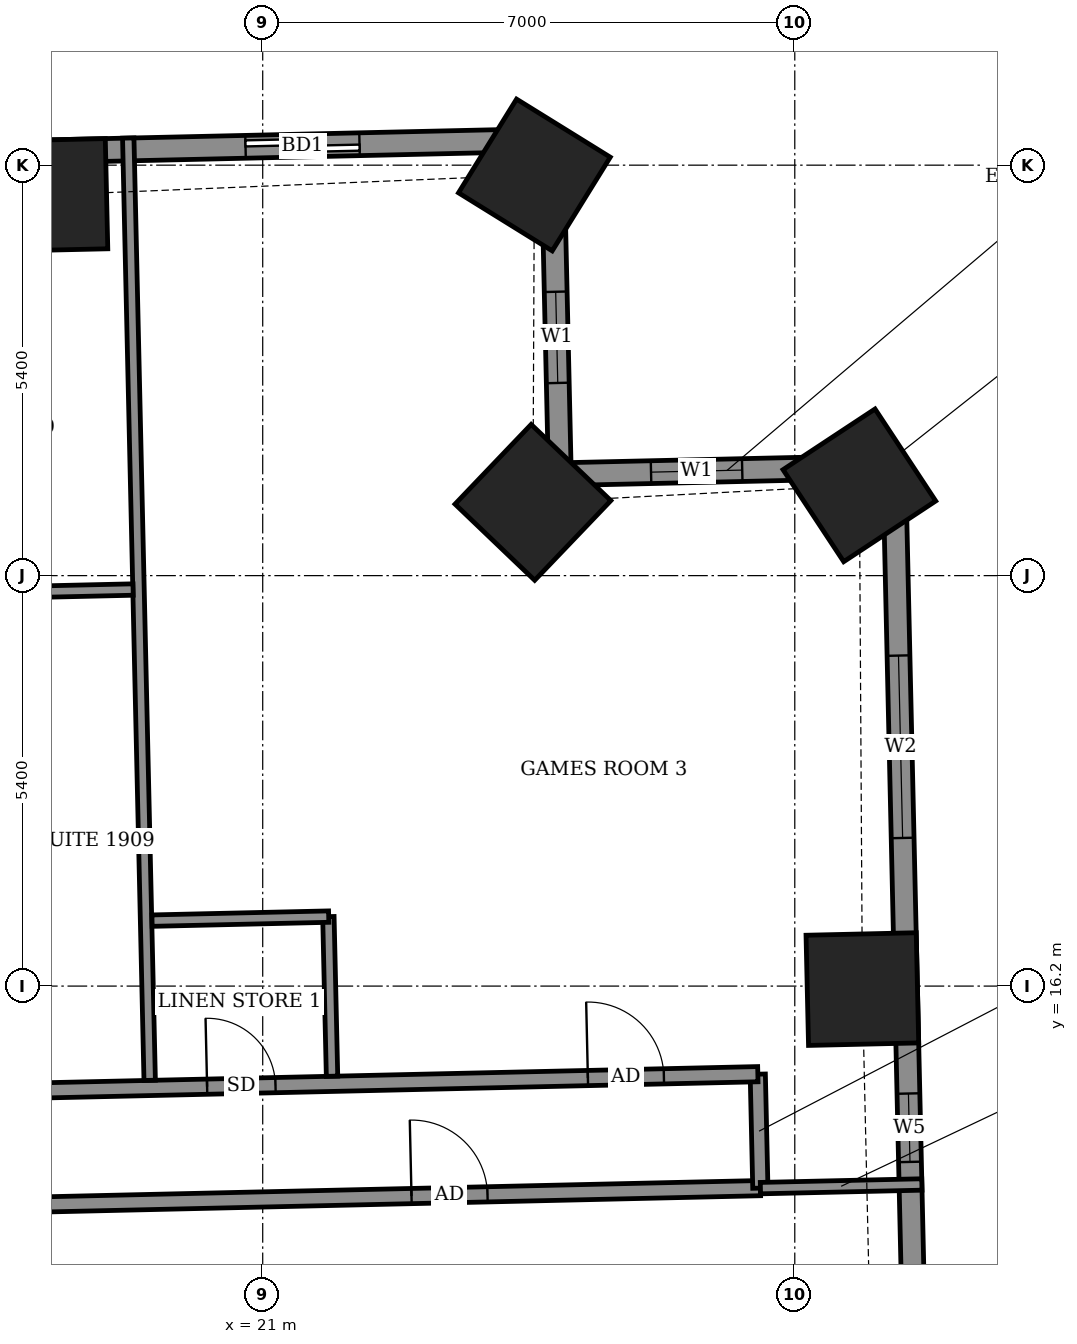
"""IFC4 building model, lengths in metres.
Left out: names, types, materials, properties, quantities, classifications, styles, units other than length and angle.
Written with IfcOpenShell. Run it as: python <this file> out.ifc"""

import sys

from ifc_helpers import new_model, si_unit, direction, frame, frame_2d, origin, origin_2d, place, context, subcontext, project, spatial, rectangle, extrude, element, fill, save


model = new_model("IFC4")
c1 = context("Model", 3, precision=1e-05, world=origin(), true_north=direction((0.0, 1.0)))
c2 = subcontext(c1, "Body", "Model", "MODEL_VIEW")
j1 = project(units=[si_unit("LENGTHUNIT", "METRE"), si_unit("PLANEANGLEUNIT", "RADIAN")], contexts=[c1])
p1 = place(None, origin())
s1 = spatial("IfcSite", under=j1, at=p1, CompositionType="ELEMENT")
p2 = place(p1, origin())
s2 = spatial("IfcBuilding", under=s1, at=p2, CompositionType="ELEMENT")
p3 = place(p2, frame((0.0, 0.0, 79.3)))
s3 = spatial("IfcBuildingStorey", under=s2, at=p3, CompositionType="ELEMENT", Elevation=79.3)
for number, where, z_axis, x_axis in (
    (1, (28.889, 16.161, -0.55), (0.0, 0.0, 1.0), (-0.023, 1.0, 0.0)),
    (2, (28.85, 22.788, -0.55), (0.0, 0.0, 1.0), (-0.551, 0.835, 0.0)),
    (3, (24.555, 22.564, -0.55), (0.0, 0.0, 1.0), (-0.723, 0.691, 0.0)),
    (4, (24.574, 26.871, -0.55), (0.0, 0.0, 1.0), (-0.85, 0.527, 0.0)),
    (5, (18.22, 26.608, -0.55), (0.0, 0.0, 1.0), (-1.0, -0.023, 0.0)),
):
    element("IfcColumn", number, at=place(p3, frame(where, z_axis=z_axis, x_axis=x_axis)), inside=s3, PredefinedType="COLUMN", context=c2, shape_type="SweptSolid", body=[
        extrude(rectangle(XDim=1.45, YDim=1.45, at=origin_2d()), origin(), (0.0, 0.0, 1.0), 3.6),
    ])
p4 = place(p3, frame((29.624, 9.108, 0.0), z_axis=(0.0, 0.0, 1.0), x_axis=(-0.022679601751, 0.999742784752, 0.0)))
e6 = element("IfcWall", 6, at=p4, inside=s3, PredefinedType="SOLIDWALL", context=c2, shape_type="SweptSolid", body=[
    extrude(rectangle(XDim=13.93, YDim=0.3, at=frame_2d((6.965, 0.0))), origin(), (0.0, 0.0, 1.0), 3.05),
])
p5 = place(p4, frame((1.754, 0.0, 0.0)))
e7 = element("IfcOpeningElement", 7, at=p5, cuts=e6, PredefinedType="OPENING", context=c2, shape_type="SweptSolid", body=[
    extrude(rectangle(XDim=1.5, YDim=2.4, at=frame_2d((0.75, 1.2))), frame((0.0, 0.16, 0.0), z_axis=(0.0, -1.0, 0.0), x_axis=(1.0, 0.0, 0.0)), (0.0, 0.0, 1.0), 0.32),
])
p6 = place(p4, frame((4.78, 0.0, 0.9)))
e8 = element("IfcOpeningElement", 8, at=p6, cuts=e6, PredefinedType="OPENING", context=c2, shape_type="SweptSolid", body=[
    extrude(rectangle(XDim=0.9, YDim=1.5, at=frame_2d((0.45, 0.75))), frame((0.0, 0.16, 0.0), z_axis=(0.0, -1.0, 0.0), x_axis=(1.0, 0.0, 0.0)), (0.0, 0.0, 1.0), 0.32),
])
p7 = place(p4, frame((9.043, 0.0, 0.9)))
e9 = element("IfcOpeningElement", 9, at=p7, cuts=e6, PredefinedType="OPENING", context=c2, shape_type="SweptSolid", body=[
    extrude(rectangle(XDim=2.4, YDim=1.5, at=frame_2d((1.2, 0.75))), frame((0.0, 0.16, 0.0), z_axis=(0.0, -1.0, 0.0), x_axis=(1.0, 0.0, 0.0)), (0.0, 0.0, 1.0), 0.32),
])
p8 = place(p3, frame((29.308, 23.034, 0.0), z_axis=(0.0, 0.0, 1.0), x_axis=(-0.999742493928, -0.022692418004, 0.0)))
e10 = element("IfcWall", 10, at=p8, inside=s3, PredefinedType="SOLIDWALL", context=c2, shape_type="SweptSolid", body=[
    extrude(rectangle(XDim=4.4, YDim=0.3, at=frame_2d((2.2, 0.0))), origin(), (0.0, 0.0, 1.0), 2.55),
])
p9 = place(p8, frame((2.0, 0.0, 0.9)))
e11 = element("IfcOpeningElement", 11, at=p9, cuts=e10, PredefinedType="OPENING", context=c2, shape_type="SweptSolid", body=[
    extrude(rectangle(XDim=1.2, YDim=1.5, at=frame_2d((0.6, 0.75))), frame((0.0, 0.16, 0.0), z_axis=(0.0, -1.0, 0.0), x_axis=(1.0, 0.0, 0.0)), (0.0, 0.0, 1.0), 0.32),
])
p10 = place(p3, frame((24.909, 22.934, 0.0), z_axis=(0.0, 0.0, 1.0), x_axis=(-0.022693676786, 0.999742465355, 0.0)))
e12 = element("IfcWall", 12, at=p10, inside=s3, PredefinedType="SOLIDWALL", context=c2, shape_type="SweptSolid", body=[
    extrude(rectangle(XDim=4.4, YDim=0.3, at=frame_2d((2.2, 0.0))), origin(), (0.0, 0.0, 1.0), 2.55),
])
p11 = place(p10, frame((1.201, 0.0, 0.9)))
e13 = element("IfcOpeningElement", 13, at=p11, cuts=e12, PredefinedType="OPENING", context=c2, shape_type="SweptSolid", body=[
    extrude(rectangle(XDim=1.2, YDim=1.5, at=frame_2d((0.6, 0.75))), frame((0.0, 0.16, 0.0), z_axis=(0.0, -1.0, 0.0), x_axis=(1.0, 0.0, 0.0)), (0.0, 0.0, 1.0), 0.32),
])
p12 = place(p3, frame((24.809, 27.333, 0.0), z_axis=(0.0, 0.0, 1.0), x_axis=(-0.999742489858, -0.022692597327, 0.0)))
e14 = element("IfcWall", 14, at=p12, inside=s3, PredefinedType="SOLIDWALL", context=c2, shape_type="SweptSolid", body=[
    extrude(rectangle(XDim=46.972, YDim=0.3, at=frame_2d((23.486, 0.0))), origin(), (0.0, 0.0, 1.0), 3.05),
])
p13 = place(p12, frame((2.536, 0.0, 0.0)))
e15 = element("IfcOpeningElement", 15, at=p13, cuts=e14, PredefinedType="OPENING", context=c2, shape_type="SweptSolid", body=[
    extrude(rectangle(XDim=1.5, YDim=2.4, at=frame_2d((0.75, 1.2))), frame((0.0, 0.16, 0.0), z_axis=(0.0, -1.0, 0.0), x_axis=(1.0, 0.0, 0.0)), (0.0, 0.0, 1.0), 0.32),
])
p14 = place(p12, frame((7.726, 0.0, 0.0)))
e16 = element("IfcOpeningElement", 16, at=p14, cuts=e14, PredefinedType="OPENING", context=c2, shape_type="SweptSolid", body=[
    extrude(rectangle(XDim=1.5, YDim=2.4, at=frame_2d((0.75, 1.2))), frame((0.0, 0.16, 0.0), z_axis=(0.0, -1.0, 0.0), x_axis=(1.0, 0.0, 0.0)), (0.0, 0.0, 1.0), 0.32),
])
p15 = place(p12, frame((10.627, 0.0, 0.0)))
e17 = element("IfcOpeningElement", 17, at=p15, cuts=e14, PredefinedType="OPENING", context=c2, shape_type="SweptSolid", body=[
    extrude(rectangle(XDim=1.5, YDim=2.4, at=frame_2d((0.75, 1.2))), frame((0.0, 0.16, 0.0), z_axis=(0.0, -1.0, 0.0), x_axis=(1.0, 0.0, 0.0)), (0.0, 0.0, 1.0), 0.32),
])
p16 = place(p12, frame((15.872, 0.0, 0.0)))
e18 = element("IfcOpeningElement", 18, at=p16, cuts=e14, PredefinedType="OPENING", context=c2, shape_type="SweptSolid", body=[
    extrude(rectangle(XDim=1.5, YDim=2.4, at=frame_2d((0.75, 1.2))), frame((0.0, 0.16, 0.0), z_axis=(0.0, -1.0, 0.0), x_axis=(1.0, 0.0, 0.0)), (0.0, 0.0, 1.0), 0.32),
])
p17 = place(p12, frame((21.253, 0.0, 0.0)))
e19 = element("IfcOpeningElement", 19, at=p17, cuts=e14, PredefinedType="OPENING", context=c2, shape_type="SweptSolid", body=[
    extrude(rectangle(XDim=1.5, YDim=2.4, at=frame_2d((0.75, 1.2))), frame((0.0, 0.16, 0.0), z_axis=(0.0, -1.0, 0.0), x_axis=(1.0, 0.0, 0.0)), (0.0, 0.0, 1.0), 0.32),
])
p18 = place(p12, frame((24.155, 0.0, 0.0)))
e20 = element("IfcOpeningElement", 20, at=p18, cuts=e14, PredefinedType="OPENING", context=c2, shape_type="SweptSolid", body=[
    extrude(rectangle(XDim=1.5, YDim=2.4, at=frame_2d((0.75, 1.2))), frame((0.0, 0.16, 0.0), z_axis=(0.0, -1.0, 0.0), x_axis=(1.0, 0.0, 0.0)), (0.0, 0.0, 1.0), 0.32),
])
p19 = place(p12, frame((29.247, 0.0, 0.0)))
e21 = element("IfcOpeningElement", 21, at=p19, cuts=e14, PredefinedType="OPENING", context=c2, shape_type="SweptSolid", body=[
    extrude(rectangle(XDim=1.5, YDim=2.4, at=frame_2d((0.75, 1.2))), frame((0.0, 0.16, 0.0), z_axis=(0.0, -1.0, 0.0), x_axis=(1.0, 0.0, 0.0)), (0.0, 0.0, 1.0), 0.32),
])
p20 = place(p12, frame((34.581, 0.0, 0.0)))
e22 = element("IfcOpeningElement", 22, at=p20, cuts=e14, PredefinedType="OPENING", context=c2, shape_type="SweptSolid", body=[
    extrude(rectangle(XDim=1.5, YDim=2.4, at=frame_2d((0.75, 1.2))), frame((0.0, 0.16, 0.0), z_axis=(0.0, -1.0, 0.0), x_axis=(1.0, 0.0, 0.0)), (0.0, 0.0, 1.0), 0.32),
])
p21 = place(p12, frame((37.483, 0.0, 0.0)))
e23 = element("IfcOpeningElement", 23, at=p21, cuts=e14, PredefinedType="OPENING", context=c2, shape_type="SweptSolid", body=[
    extrude(rectangle(XDim=1.5, YDim=2.4, at=frame_2d((0.75, 1.2))), frame((0.0, 0.16, 0.0), z_axis=(0.0, -1.0, 0.0), x_axis=(1.0, 0.0, 0.0)), (0.0, 0.0, 1.0), 0.32),
])
p22 = place(p12, frame((42.35, 0.0, 0.9)))
e24 = element("IfcOpeningElement", 24, at=p22, cuts=e14, PredefinedType="OPENING", context=c2, shape_type="SweptSolid", body=[
    extrude(rectangle(XDim=2.4, YDim=1.5, at=frame_2d((1.2, 0.75))), frame((0.0, 0.16, 0.0), z_axis=(0.0, -1.0, 0.0), x_axis=(1.0, 0.0, 0.0)), (0.0, 0.0, 1.0), 0.32),
])
p23 = place(p3, frame((17.176, 13.306, 0.0), z_axis=(0.0, 0.0, 1.0), x_axis=(0.999741057438, 0.022755616292, 0.0)))
e25 = element("IfcWall", 25, at=p23, inside=s3, PredefinedType="PARTITIONING", context=c2, shape_type="SweptSolid", body=[
    extrude(rectangle(XDim=10.375, YDim=0.2, at=frame_2d((5.188, 0.0))), origin(), (0.0, 0.0, 1.0), 3.05),
])
p24 = place(p23, frame((5.783, 0.0, 0.0)))
e26 = element("IfcOpeningElement", 26, at=p24, cuts=e25, PredefinedType="OPENING", context=c2, shape_type="SweptSolid", body=[
    extrude(rectangle(XDim=1.0, YDim=2.1, at=frame_2d((0.5, 1.05))), frame((0.0, 0.11, 0.0), z_axis=(0.0, -1.0, 0.0), x_axis=(1.0, 0.0, 0.0)), (0.0, 0.0, 1.0), 0.22),
])
p25 = place(p3, frame((27.547, 13.542, 0.0), z_axis=(0.0, 0.0, 1.0), x_axis=(-0.02279537805, 0.999740151609, 0.0)))
e27 = element("IfcWall", 27, at=p25, inside=s3, PredefinedType="PARTITIONING", context=c2, shape_type="SweptSolid", body=[
    extrude(rectangle(XDim=1.5, YDim=0.2, at=frame_2d((0.75, 0.0))), origin(), (0.0, 0.0, 1.0), 3.05),
])
p26 = place(p3, frame((27.548, 13.542, 0.0), z_axis=(0.0, 0.0, 1.0), x_axis=(0.999743730464, 0.022637875276, 0.0)))
e28 = element("IfcWall", 28, at=p26, inside=s3, PredefinedType="PARTITIONING", context=c2, shape_type="SweptSolid", body=[
    extrude(rectangle(XDim=2.125, YDim=0.15, at=frame_2d((1.062, 0.0))), origin(), (0.0, 0.0, 1.0), 2.55),
])
p27 = place(p3, frame((-24.895, 13.852, 0.0), z_axis=(0.0, 0.0, 1.0), x_axis=(0.999742765181, 0.02268046447, 0.0)))
e29 = element("IfcWall", 29, at=p27, inside=s3, PredefinedType="PARTITIONING", context=c2, shape_type="SweptSolid", body=[
    extrude(rectangle(XDim=52.422, YDim=0.2, at=frame_2d((26.211, 0.0))), origin(), (0.0, 0.0, 1.0), 3.05),
])
p28 = place(p27, frame((50.186, 0.0, 0.0)))
e30 = element("IfcOpeningElement", 30, at=p28, cuts=e29, PredefinedType="OPENING", context=c2, shape_type="SweptSolid", body=[
    extrude(rectangle(XDim=1.0, YDim=2.1, at=frame_2d((0.5, 1.05))), frame((0.0, 0.11, 0.0), z_axis=(0.0, -1.0, 0.0), x_axis=(1.0, 0.0, 0.0)), (0.0, 0.0, 1.0), 0.22),
])
p29 = place(p27, frame((45.175, 0.0, 0.0)))
e31 = element("IfcOpeningElement", 31, at=p29, cuts=e29, PredefinedType="OPENING", context=c2, shape_type="SweptSolid", body=[
    extrude(rectangle(XDim=0.9, YDim=2.1, at=frame_2d((0.45, 1.05))), frame((0.0, 0.11, 0.0), z_axis=(0.0, -1.0, 0.0), x_axis=(1.0, 0.0, 0.0)), (0.0, 0.0, 1.0), 0.22),
])
p30 = place(p27, frame((40.625, 0.0, 0.0)))
e32 = element("IfcOpeningElement", 32, at=p30, cuts=e29, PredefinedType="OPENING", context=c2, shape_type="SweptSolid", body=[
    extrude(rectangle(XDim=0.9, YDim=2.1, at=frame_2d((0.45, 1.05))), frame((0.0, 0.11, 0.0), z_axis=(0.0, -1.0, 0.0), x_axis=(1.0, 0.0, 0.0)), (0.0, 0.0, 1.0), 0.22),
])
p31 = place(p27, frame((38.65, 0.0, 0.0)))
e33 = element("IfcOpeningElement", 33, at=p31, cuts=e29, PredefinedType="OPENING", context=c2, shape_type="SweptSolid", body=[
    extrude(rectangle(XDim=0.9, YDim=2.1, at=frame_2d((0.45, 1.05))), frame((0.0, 0.11, 0.0), z_axis=(0.0, -1.0, 0.0), x_axis=(1.0, 0.0, 0.0)), (0.0, 0.0, 1.0), 0.22),
])
p32 = place(p27, frame((31.725, 0.0, 0.0)))
e34 = element("IfcOpeningElement", 34, at=p32, cuts=e29, PredefinedType="OPENING", context=c2, shape_type="SweptSolid", body=[
    extrude(rectangle(XDim=0.9, YDim=2.1, at=frame_2d((0.45, 1.05))), frame((0.0, 0.11, 0.0), z_axis=(0.0, -1.0, 0.0), x_axis=(1.0, 0.0, 0.0)), (0.0, 0.0, 1.0), 0.22),
])
p33 = place(p27, frame((29.575, 0.0, 0.0)))
e35 = element("IfcOpeningElement", 35, at=p33, cuts=e29, PredefinedType="OPENING", context=c2, shape_type="SweptSolid", body=[
    extrude(rectangle(XDim=0.9, YDim=2.1, at=frame_2d((0.45, 1.05))), frame((0.0, 0.11, 0.0), z_axis=(0.0, -1.0, 0.0), x_axis=(1.0, 0.0, 0.0)), (0.0, 0.0, 1.0), 0.22),
])
p34 = place(p27, frame((22.75, 0.0, 0.0)))
e36 = element("IfcOpeningElement", 36, at=p34, cuts=e29, PredefinedType="OPENING", context=c2, shape_type="SweptSolid", body=[
    extrude(rectangle(XDim=0.9, YDim=2.1, at=frame_2d((0.45, 1.05))), frame((0.0, 0.11, 0.0), z_axis=(0.0, -1.0, 0.0), x_axis=(1.0, 0.0, 0.0)), (0.0, 0.0, 1.0), 0.22),
])
p35 = place(p27, frame((20.75, 0.0, 0.0)))
e37 = element("IfcOpeningElement", 37, at=p35, cuts=e29, PredefinedType="OPENING", context=c2, shape_type="SweptSolid", body=[
    extrude(rectangle(XDim=0.9, YDim=2.1, at=frame_2d((0.45, 1.05))), frame((0.0, 0.11, 0.0), z_axis=(0.0, -1.0, 0.0), x_axis=(1.0, 0.0, 0.0)), (0.0, 0.0, 1.0), 0.22),
])
p36 = place(p27, frame((13.95, 0.0, 0.0)))
e38 = element("IfcOpeningElement", 38, at=p36, cuts=e29, PredefinedType="OPENING", context=c2, shape_type="SweptSolid", body=[
    extrude(rectangle(XDim=0.9, YDim=2.1, at=frame_2d((0.45, 1.05))), frame((0.0, 0.11, 0.0), z_axis=(0.0, -1.0, 0.0), x_axis=(1.0, 0.0, 0.0)), (0.0, 0.0, 1.0), 0.22),
])
p37 = place(p27, frame((11.85, 0.0, 0.0)))
e39 = element("IfcOpeningElement", 39, at=p37, cuts=e29, PredefinedType="OPENING", context=c2, shape_type="SweptSolid", body=[
    extrude(rectangle(XDim=0.9, YDim=2.1, at=frame_2d((0.45, 1.05))), frame((0.0, 0.11, 0.0), z_axis=(0.0, -1.0, 0.0), x_axis=(1.0, 0.0, 0.0)), (0.0, 0.0, 1.0), 0.22),
])
p38 = place(p27, frame((1.425, 0.0, 0.0)))
e40 = element("IfcOpeningElement", 40, at=p38, cuts=e29, PredefinedType="OPENING", context=c2, shape_type="SweptSolid", body=[
    extrude(rectangle(XDim=1.0, YDim=2.1, at=frame_2d((0.5, 1.05))), frame((0.0, 0.11, 0.0), z_axis=(0.0, -1.0, 0.0), x_axis=(1.0, 0.0, 0.0)), (0.0, 0.0, 1.0), 0.22),
])
p39 = place(p27, frame((6.925, 0.0, 0.0)))
e41 = element("IfcOpeningElement", 41, at=p39, cuts=e29, PredefinedType="OPENING", context=c2, shape_type="SweptSolid", body=[
    extrude(rectangle(XDim=0.9, YDim=2.1, at=frame_2d((0.45, 1.05))), frame((0.0, 0.11, 0.0), z_axis=(0.0, -1.0, 0.0), x_axis=(1.0, 0.0, 0.0)), (0.0, 0.0, 1.0), 0.22),
])
p40 = place(p3, frame((19.513, 14.96, 0.0), z_axis=(0.0, 0.0, 1.0), x_axis=(-0.022740189192, 0.999741408463, 0.0)))
e42 = element("IfcWall", 42, at=p40, inside=s3, PredefinedType="PARTITIONING", context=c2, shape_type="SweptSolid", body=[
    extrude(rectangle(XDim=12.4, YDim=0.15, at=frame_2d((6.2, 0.0))), origin(), (0.0, 0.0, 1.0), 2.55),
])
p41 = place(p3, frame((21.912, 15.014, 0.0), z_axis=(0.0, 0.0, 1.0), x_axis=(-0.022895647347, 0.999737860308, 0.0)))
e43 = element("IfcWall", 43, at=p41, inside=s3, PredefinedType="PARTITIONING", context=c2, shape_type="SweptSolid", body=[
    extrude(rectangle(XDim=2.101, YDim=0.15, at=frame_2d((1.05, 0.0))), origin(), (0.0, 0.0, 1.0), 3.05),
])
for number, where, z_axis, x_axis in (
    (44, (19.544, 17.061, 0.0), (0.0, 0.0, 1.0), (1.0, 0.023, 0.0)),
    (45, (16.971, 21.364, 0.0), (0.0, 0.0, 1.0), (1.0, 0.023, 0.0)),
):
    element("IfcWall", number, at=place(p3, frame(where, z_axis=z_axis, x_axis=x_axis)), inside=s3, PredefinedType="PARTITIONING", context=c2, shape_type="SweptSolid", body=[
        extrude(rectangle(XDim=2.324, YDim=0.15, at=frame_2d((1.162, 0.0))), origin(), (0.0, 0.0, 1.0), 3.05),
    ])
p42 = place(p6, origin())
e46 = element("IfcWindow", 46, at=p42, inside=s3, PartitioningType="SINGLE_PANEL", PredefinedType="WINDOW", context=c2, shape_type="SweptSolid", body=[
    extrude(rectangle(XDim=0.9, YDim=1.5, at=frame_2d((0.45, 0.75))), frame((0.0, 0.03, 0.0), z_axis=(0.0, -1.0, 0.0), x_axis=(1.0, 0.0, 0.0)), (0.0, 0.0, 1.0), 0.06),
])
fill(e8, e46)
p43 = place(p7, origin())
e47 = element("IfcWindow", 47, at=p43, inside=s3, PartitioningType="DOUBLE_PANEL_VERTICAL", PredefinedType="WINDOW", context=c2, shape_type="SweptSolid", body=[
    extrude(rectangle(XDim=2.4, YDim=1.5, at=frame_2d((1.2, 0.75))), frame((0.0, 0.03, 0.0), z_axis=(0.0, -1.0, 0.0), x_axis=(1.0, 0.0, 0.0)), (0.0, 0.0, 1.0), 0.06),
])
fill(e9, e47)
p44 = place(p9, origin())
e48 = element("IfcWindow", 48, at=p44, inside=s3, PartitioningType="SINGLE_PANEL", PredefinedType="WINDOW", context=c2, shape_type="SweptSolid", body=[
    extrude(rectangle(XDim=1.2, YDim=1.5, at=frame_2d((0.6, 0.75))), frame((0.0, 0.03, 0.0), z_axis=(0.0, -1.0, 0.0), x_axis=(1.0, 0.0, 0.0)), (0.0, 0.0, 1.0), 0.06),
])
fill(e11, e48)
p45 = place(p11, origin())
e49 = element("IfcWindow", 49, at=p45, inside=s3, PartitioningType="SINGLE_PANEL", PredefinedType="WINDOW", context=c2, shape_type="SweptSolid", body=[
    extrude(rectangle(XDim=1.2, YDim=1.5, at=frame_2d((0.6, 0.75))), frame((0.0, 0.03, 0.0), z_axis=(0.0, -1.0, 0.0), x_axis=(1.0, 0.0, 0.0)), (0.0, 0.0, 1.0), 0.06),
])
fill(e13, e49)
p46 = place(p13, origin())
e50 = element("IfcDoor", 50, at=p46, inside=s3, OperationType="SLIDING_TO_LEFT", PredefinedType="DOOR", context=c2, shape_type="SweptSolid", body=[
    extrude(rectangle(XDim=1.5, YDim=2.4, at=frame_2d((0.75, 1.2))), frame((0.0, 0.025, 0.0), z_axis=(0.0, -1.0, 0.0), x_axis=(1.0, 0.0, 0.0)), (0.0, 0.0, 1.0), 0.05),
])
fill(e15, e50)
p47 = place(p24, origin())
e51 = element("IfcDoor", 51, at=p47, inside=s3, OperationType="SINGLE_SWING_RIGHT", PredefinedType="DOOR", context=c2, shape_type="SweptSolid", body=[
    extrude(rectangle(XDim=1.0, YDim=2.1, at=frame_2d((0.5, 1.05))), frame((0.0, 0.025, 0.0), z_axis=(0.0, -1.0, 0.0), x_axis=(1.0, 0.0, 0.0)), (0.0, 0.0, 1.0), 0.05),
])
fill(e26, e51)
p48 = place(p28, origin())
e52 = element("IfcDoor", 52, at=p48, inside=s3, OperationType="SINGLE_SWING_LEFT", PredefinedType="DOOR", context=c2, shape_type="SweptSolid", body=[
    extrude(rectangle(XDim=1.0, YDim=2.1, at=frame_2d((0.5, 1.05))), frame((0.0, 0.025, 0.0), z_axis=(0.0, -1.0, 0.0), x_axis=(1.0, 0.0, 0.0)), (0.0, 0.0, 1.0), 0.05),
])
fill(e30, e52)
p49 = place(p29, origin())
e53 = element("IfcDoor", 53, at=p49, inside=s3, OperationType="SINGLE_SWING_LEFT", PredefinedType="DOOR", context=c2, shape_type="SweptSolid", body=[
    extrude(rectangle(XDim=0.9, YDim=2.1, at=frame_2d((0.45, 1.05))), frame((0.0, 0.025, 0.0), z_axis=(0.0, -1.0, 0.0), x_axis=(1.0, 0.0, 0.0)), (0.0, 0.0, 1.0), 0.05),
])
fill(e31, e53)
save(model, sys.argv[1])
